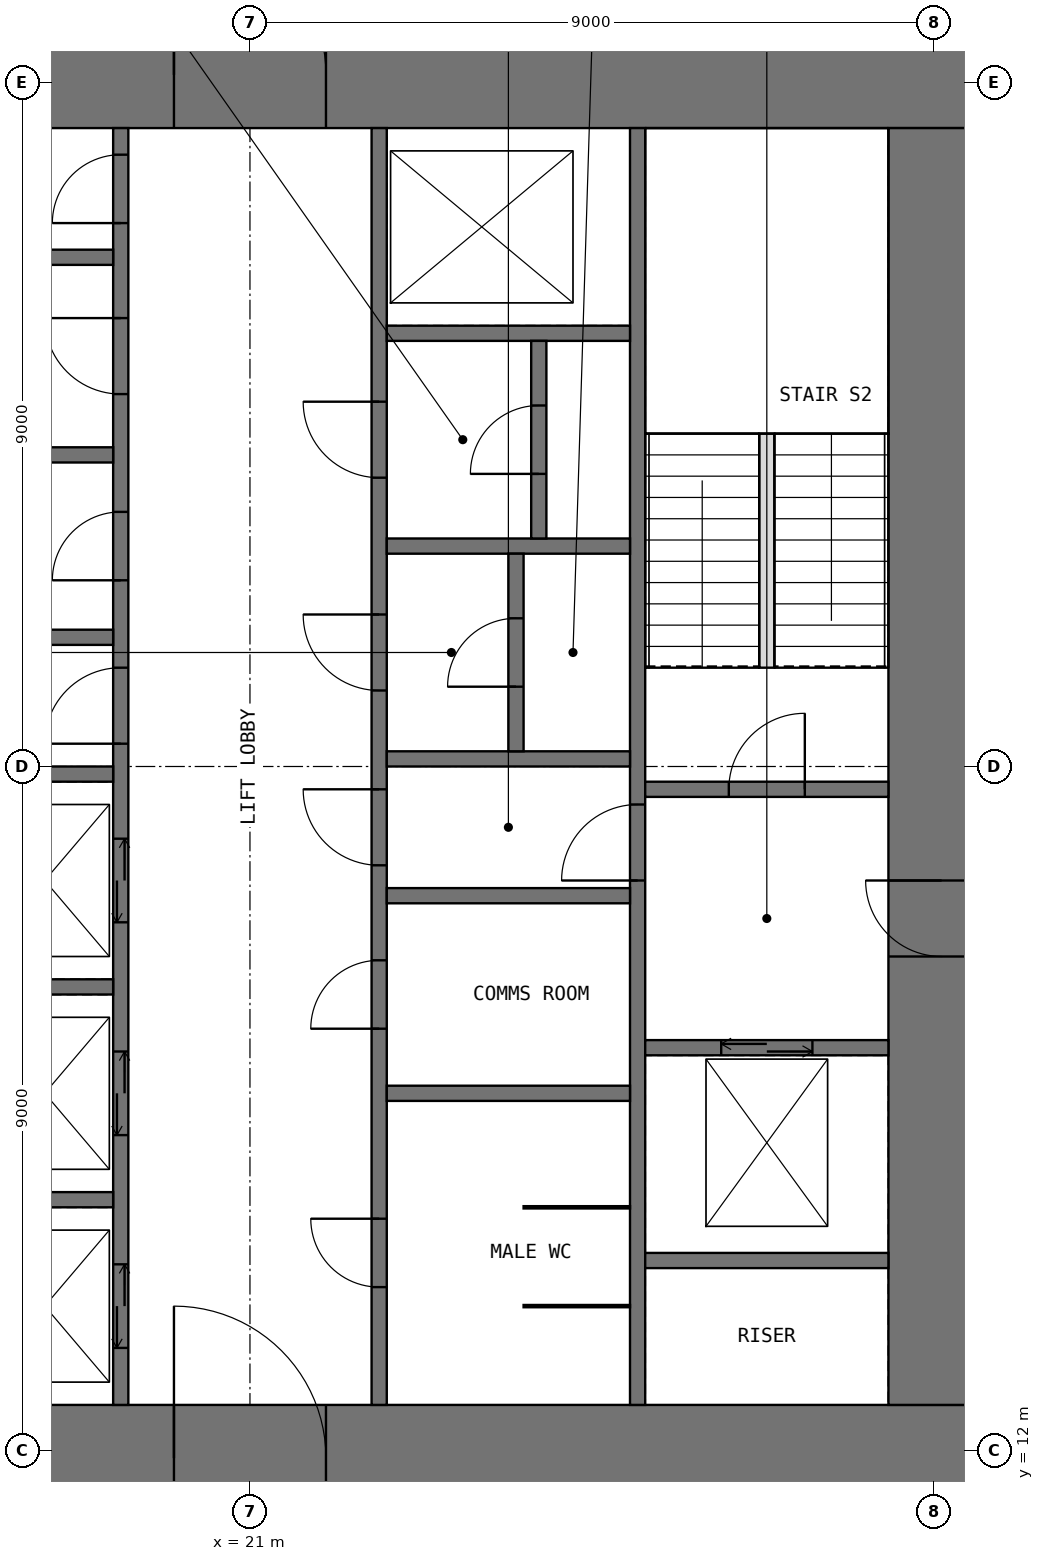
"""IFC4 building model, lengths in metres.
Left out: names, types, materials, properties, quantities, classifications, styles, units other than length and angle.
Written with IfcOpenShell. Run it as: python <this file> out.ifc"""

import sys

from ifc_helpers import new_model, si_unit, direction, frame, frame_2d, origin, place, context, subcontext, project, spatial, rectangle, extrude, element, fill, save


model = new_model("IFC4")
c1 = context("Model", 3, precision=1e-05, world=origin(), true_north=direction((0.0, 1.0)))
c2 = subcontext(c1, "Body", "Model", "MODEL_VIEW")
j1 = project(units=[si_unit("LENGTHUNIT", "METRE"), si_unit("PLANEANGLEUNIT", "RADIAN")], contexts=[c1])
p1 = place(None, origin())
s1 = spatial("IfcSite", under=j1, at=p1, CompositionType="ELEMENT")
p2 = place(p1, origin())
s2 = spatial("IfcBuilding", under=s1, at=p2, CompositionType="ELEMENT")
p3 = place(p2, frame((0.0, 0.0, 226.5)))
s3 = spatial("IfcBuildingStorey", under=s2, at=p3, CompositionType="ELEMENT", Elevation=226.5)
p4 = place(p3, frame((11.2, 11.9, -0.05), z_axis=(0.0, 0.0, 1.0), x_axis=(1.0, 0.0, 0.0)))
e1 = element("IfcWall", 1, at=p4, inside=s3, PredefinedType="SHEAR", context=c2, shape_type="SweptSolid", body=[
    extrude(rectangle(XDim=19.6, YDim=1.4, at=frame_2d((9.8, 0.0))), origin(), (0.0, 0.0, 1.0), 4.0),
])
p5 = place(p4, frame((8.8, 0.0, 0.05)))
e2 = element("IfcOpeningElement", 2, at=p5, cuts=e1, PredefinedType="OPENING", context=c2, shape_type="SweptSolid", body=[
    extrude(rectangle(XDim=2.0, YDim=2.2, at=frame_2d((1.0, 1.1))), frame((0.0, 0.71, 0.0), z_axis=(0.0, -1.0, 0.0), x_axis=(1.0, 0.0, 0.0)), (0.0, 0.0, 1.0), 1.42),
])
p6 = place(p3, frame((11.2, 30.1, -0.05), z_axis=(0.0, 0.0, 1.0), x_axis=(1.0, 0.0, 0.0)))
e3 = element("IfcWall", 3, at=p6, inside=s3, PredefinedType="SHEAR", context=c2, shape_type="SweptSolid", body=[
    extrude(rectangle(XDim=19.6, YDim=1.4, at=frame_2d((9.8, 0.0))), origin(), (0.0, 0.0, 1.0), 4.0),
])
p7 = place(p6, frame((8.8, 0.0, 0.05)))
e4 = element("IfcOpeningElement", 4, at=p7, cuts=e3, PredefinedType="OPENING", context=c2, shape_type="SweptSolid", body=[
    extrude(rectangle(XDim=2.0, YDim=2.2, at=frame_2d((1.0, 1.1))), frame((0.0, 0.71, 0.0), z_axis=(0.0, -1.0, 0.0), x_axis=(1.0, 0.0, 0.0)), (0.0, 0.0, 1.0), 1.42),
])
p8 = place(p3, frame((30.1, 12.6, -0.05), z_axis=(0.0, 0.0, 1.0), x_axis=(0.0, 1.0, 0.0)))
e5 = element("IfcWall", 5, at=p8, inside=s3, PredefinedType="SHEAR", context=c2, shape_type="SweptSolid", body=[
    extrude(rectangle(XDim=16.8, YDim=1.4, at=frame_2d((8.4, 0.0))), origin(), (0.0, 0.0, 1.0), 4.0),
])
p9 = place(p8, frame((5.9, 0.0, 0.05)))
e6 = element("IfcOpeningElement", 6, at=p9, cuts=e5, PredefinedType="OPENING", context=c2, shape_type="SweptSolid", body=[
    extrude(rectangle(XDim=1.0, YDim=2.2, at=frame_2d((0.5, 1.1))), frame((0.0, 0.71, 0.0), z_axis=(0.0, -1.0, 0.0), x_axis=(1.0, 0.0, 0.0)), (0.0, 0.0, 1.0), 1.42),
])
p10 = place(p3, frame((19.3, 12.6, -0.05), z_axis=(0.0, 0.0, 1.0), x_axis=(0.0, 1.0, 0.0)))
e7 = element("IfcWall", 7, at=p10, inside=s3, PredefinedType="SHEAR", context=c2, shape_type="SweptSolid", body=[
    extrude(rectangle(XDim=16.8, YDim=0.2, at=frame_2d((8.4, 0.0))), origin(), (0.0, 0.0, 1.0), 4.0),
])
p11 = place(p10, frame((8.7, 0.0, 0.05)))
e8 = element("IfcOpeningElement", 8, at=p11, cuts=e7, PredefinedType="OPENING", context=c2, shape_type="SweptSolid", body=[
    extrude(rectangle(XDim=1.0, YDim=2.2, at=frame_2d((0.5, 1.1))), frame((0.0, 0.11, 0.0), z_axis=(0.0, -1.0, 0.0), x_axis=(1.0, 0.0, 0.0)), (0.0, 0.0, 1.0), 0.22),
])
p12 = place(p10, frame((10.85, 0.0, 0.05)))
e9 = element("IfcOpeningElement", 9, at=p12, cuts=e7, PredefinedType="OPENING", context=c2, shape_type="SweptSolid", body=[
    extrude(rectangle(XDim=0.9, YDim=2.2, at=frame_2d((0.45, 1.1))), frame((0.0, 0.11, 0.0), z_axis=(0.0, -1.0, 0.0), x_axis=(1.0, 0.0, 0.0)), (0.0, 0.0, 1.0), 0.22),
])
p13 = place(p10, frame((13.3, 0.0, 0.05)))
e10 = element("IfcOpeningElement", 10, at=p13, cuts=e7, PredefinedType="OPENING", context=c2, shape_type="SweptSolid", body=[
    extrude(rectangle(XDim=1.0, YDim=2.2, at=frame_2d((0.5, 1.1))), frame((0.0, 0.11, 0.0), z_axis=(0.0, -1.0, 0.0), x_axis=(1.0, 0.0, 0.0)), (0.0, 0.0, 1.0), 0.22),
])
p14 = place(p10, frame((15.55, 0.0, 0.05)))
e11 = element("IfcOpeningElement", 11, at=p14, cuts=e7, PredefinedType="OPENING", context=c2, shape_type="SweptSolid", body=[
    extrude(rectangle(XDim=0.9, YDim=2.2, at=frame_2d((0.45, 1.1))), frame((0.0, 0.11, 0.0), z_axis=(0.0, -1.0, 0.0), x_axis=(1.0, 0.0, 0.0)), (0.0, 0.0, 1.0), 0.22),
])
p15 = place(p10, frame((0.75, 0.0, 0.05)))
e12 = element("IfcOpeningElement", 12, at=p15, cuts=e7, PredefinedType="OPENING", context=c2, shape_type="SweptSolid", body=[
    extrude(rectangle(XDim=1.1, YDim=2.2, at=frame_2d((0.55, 1.1))), frame((0.0, 0.11, 0.0), z_axis=(0.0, -1.0, 0.0), x_axis=(1.0, 0.0, 0.0)), (0.0, 0.0, 1.0), 0.22),
])
p16 = place(p10, frame((3.55, 0.0, 0.05)))
e13 = element("IfcOpeningElement", 13, at=p16, cuts=e7, PredefinedType="OPENING", context=c2, shape_type="SweptSolid", body=[
    extrude(rectangle(XDim=1.1, YDim=2.2, at=frame_2d((0.55, 1.1))), frame((0.0, 0.11, 0.0), z_axis=(0.0, -1.0, 0.0), x_axis=(1.0, 0.0, 0.0)), (0.0, 0.0, 1.0), 0.22),
])
p17 = place(p10, frame((6.35, 0.0, 0.05)))
e14 = element("IfcOpeningElement", 14, at=p17, cuts=e7, PredefinedType="OPENING", context=c2, shape_type="SweptSolid", body=[
    extrude(rectangle(XDim=1.1, YDim=2.2, at=frame_2d((0.55, 1.1))), frame((0.0, 0.11, 0.0), z_axis=(0.0, -1.0, 0.0), x_axis=(1.0, 0.0, 0.0)), (0.0, 0.0, 1.0), 0.22),
])
p18 = place(p3, frame((22.7, 12.6, -0.05), z_axis=(0.0, 0.0, 1.0), x_axis=(0.0, 1.0, 0.0)))
e15 = element("IfcWall", 15, at=p18, inside=s3, PredefinedType="SHEAR", context=c2, shape_type="SweptSolid", body=[
    extrude(rectangle(XDim=16.8, YDim=0.2, at=frame_2d((8.4, 0.0))), origin(), (0.0, 0.0, 1.0), 4.0),
])
p19 = place(p18, frame((7.1, 0.0, 0.05)))
e16 = element("IfcOpeningElement", 16, at=p19, cuts=e15, PredefinedType="OPENING", context=c2, shape_type="SweptSolid", body=[
    extrude(rectangle(XDim=1.0, YDim=2.2, at=frame_2d((0.5, 1.1))), frame((0.0, 0.11, 0.0), z_axis=(0.0, -1.0, 0.0), x_axis=(1.0, 0.0, 0.0)), (0.0, 0.0, 1.0), 0.22),
])
p20 = place(p18, frame((1.55, 0.0, 0.05)))
e17 = element("IfcOpeningElement", 17, at=p20, cuts=e15, PredefinedType="OPENING", context=c2, shape_type="SweptSolid", body=[
    extrude(rectangle(XDim=0.9, YDim=2.2, at=frame_2d((0.45, 1.1))), frame((0.0, 0.11, 0.0), z_axis=(0.0, -1.0, 0.0), x_axis=(1.0, 0.0, 0.0)), (0.0, 0.0, 1.0), 0.22),
])
p21 = place(p18, frame((4.95, 0.0, 0.05)))
e18 = element("IfcOpeningElement", 18, at=p21, cuts=e15, PredefinedType="OPENING", context=c2, shape_type="SweptSolid", body=[
    extrude(rectangle(XDim=0.9, YDim=2.2, at=frame_2d((0.45, 1.1))), frame((0.0, 0.11, 0.0), z_axis=(0.0, -1.0, 0.0), x_axis=(1.0, 0.0, 0.0)), (0.0, 0.0, 1.0), 0.22),
])
p22 = place(p18, frame((9.4, 0.0, 0.05)))
e19 = element("IfcOpeningElement", 19, at=p22, cuts=e15, PredefinedType="OPENING", context=c2, shape_type="SweptSolid", body=[
    extrude(rectangle(XDim=1.0, YDim=2.2, at=frame_2d((0.5, 1.1))), frame((0.0, 0.11, 0.0), z_axis=(0.0, -1.0, 0.0), x_axis=(1.0, 0.0, 0.0)), (0.0, 0.0, 1.0), 0.22),
])
p23 = place(p18, frame((12.2, 0.0, 0.05)))
e20 = element("IfcOpeningElement", 20, at=p23, cuts=e15, PredefinedType="OPENING", context=c2, shape_type="SweptSolid", body=[
    extrude(rectangle(XDim=1.0, YDim=2.2, at=frame_2d((0.5, 1.1))), frame((0.0, 0.11, 0.0), z_axis=(0.0, -1.0, 0.0), x_axis=(1.0, 0.0, 0.0)), (0.0, 0.0, 1.0), 0.22),
])
p24 = place(p3, frame((26.1, 12.6, -0.05), z_axis=(0.0, 0.0, 1.0), x_axis=(0.0, 1.0, 0.0)))
e21 = element("IfcWall", 21, at=p24, inside=s3, PredefinedType="SHEAR", context=c2, shape_type="SweptSolid", body=[
    extrude(rectangle(XDim=16.8, YDim=0.2, at=frame_2d((8.4, 0.0))), origin(), (0.0, 0.0, 1.0), 4.0),
])
p25 = place(p24, frame((6.9, 0.0, 0.05)))
e22 = element("IfcOpeningElement", 22, at=p25, cuts=e21, PredefinedType="OPENING", context=c2, shape_type="SweptSolid", body=[
    extrude(rectangle(XDim=1.0, YDim=2.2, at=frame_2d((0.5, 1.1))), frame((0.0, 0.11, 0.0), z_axis=(0.0, -1.0, 0.0), x_axis=(1.0, 0.0, 0.0)), (0.0, 0.0, 1.0), 0.22),
])
for number, where, z_axis, x_axis in (
    (23, (16.0, 15.3, -0.05), (0.0, 0.0, 1.0), (1.0, 0.0, 0.0)),
    (24, (16.0, 18.1, -0.05), (0.0, 0.0, 1.0), (1.0, 0.0, 0.0)),
    (25, (16.0, 20.9, -0.05), (0.0, 0.0, 1.0), (1.0, 0.0, 0.0)),
    (26, (16.0, 22.7, -0.05), (0.0, 0.0, 1.0), (1.0, 0.0, 0.0)),
    (27, (16.0, 25.1, -0.05), (0.0, 0.0, 1.0), (1.0, 0.0, 0.0)),
    (28, (16.0, 27.7, -0.05), (0.0, 0.0, 1.0), (1.0, 0.0, 0.0)),
    (29, (22.8, 16.7, -0.05), (0.0, 0.0, 1.0), (1.0, 0.0, 0.0)),
    (30, (22.8, 19.3, -0.05), (0.0, 0.0, 1.0), (1.0, 0.0, 0.0)),
    (31, (22.8, 21.1, -0.05), (0.0, 0.0, 1.0), (1.0, 0.0, 0.0)),
    (32, (22.8, 23.9, -0.05), (0.0, 0.0, 1.0), (1.0, 0.0, 0.0)),
    (33, (22.8, 26.7, -0.05), (0.0, 0.0, 1.0), (1.0, 0.0, 0.0)),
    (34, (26.2, 14.5, -0.05), (0.0, 0.0, 1.0), (1.0, 0.0, 0.0)),
):
    element("IfcWall", number, at=place(p3, frame(where, z_axis=z_axis, x_axis=x_axis)), inside=s3, PredefinedType="SHEAR", context=c2, shape_type="SweptSolid", body=[
        extrude(rectangle(XDim=3.2, YDim=0.2, at=frame_2d((1.6, 0.0))), origin(), (0.0, 0.0, 1.0), 4.0),
    ])
p26 = place(p3, frame((26.2, 17.3, -0.05), z_axis=(0.0, 0.0, 1.0), x_axis=(1.0, 0.0, 0.0)))
e35 = element("IfcWall", 35, at=p26, inside=s3, PredefinedType="SHEAR", context=c2, shape_type="SweptSolid", body=[
    extrude(rectangle(XDim=3.2, YDim=0.2, at=frame_2d((1.6, 0.0))), origin(), (0.0, 0.0, 1.0), 4.0),
])
p27 = place(p26, frame((1.0, 0.0, 0.05)))
e36 = element("IfcOpeningElement", 36, at=p27, cuts=e35, PredefinedType="OPENING", context=c2, shape_type="SweptSolid", body=[
    extrude(rectangle(XDim=1.2, YDim=2.2, at=frame_2d((0.6, 1.1))), frame((0.0, 0.11, 0.0), z_axis=(0.0, -1.0, 0.0), x_axis=(1.0, 0.0, 0.0)), (0.0, 0.0, 1.0), 0.22),
])
p28 = place(p3, frame((26.2, 20.7, -0.05), z_axis=(0.0, 0.0, 1.0), x_axis=(1.0, 0.0, 0.0)))
e37 = element("IfcWall", 37, at=p28, inside=s3, PredefinedType="SHEAR", context=c2, shape_type="SweptSolid", body=[
    extrude(rectangle(XDim=3.2, YDim=0.2, at=frame_2d((1.6, 0.0))), origin(), (0.0, 0.0, 1.0), 4.0),
])
p29 = place(p28, frame((1.1, 0.0, 0.05)))
e38 = element("IfcOpeningElement", 38, at=p29, cuts=e37, PredefinedType="OPENING", context=c2, shape_type="SweptSolid", body=[
    extrude(rectangle(XDim=1.0, YDim=2.2, at=frame_2d((0.5, 1.1))), frame((0.0, 0.11, 0.0), z_axis=(0.0, -1.0, 0.0), x_axis=(1.0, 0.0, 0.0)), (0.0, 0.0, 1.0), 0.22),
])
for number, where, z_axis, x_axis in (
    (39, (24.6, 13.9, 0.0), (0.0, 0.0, 1.0), (1.0, 0.0, 0.0)),
    (40, (24.6, 15.2, 0.0), (0.0, 0.0, 1.0), (1.0, 0.0, 0.0)),
):
    element("IfcWall", number, at=place(p3, frame(where, z_axis=z_axis, x_axis=x_axis)), inside=s3, PredefinedType="PARTITIONING", context=c2, shape_type="SweptSolid", body=[
        extrude(rectangle(XDim=1.4, YDim=0.03, at=frame_2d((0.7, 0.0))), origin(), (0.0, 0.0, 1.0), 3.75),
    ])
p30 = place(p3, frame((24.5, 21.2, -0.05), z_axis=(0.0, 0.0, 1.0), x_axis=(0.0, 1.0, 0.0)))
e41 = element("IfcWall", 41, at=p30, inside=s3, PredefinedType="SHEAR", context=c2, shape_type="SweptSolid", body=[
    extrude(rectangle(XDim=2.6, YDim=0.2, at=frame_2d((1.3, 0.0))), origin(), (0.0, 0.0, 1.0), 4.0),
])
p31 = place(p30, frame((0.85, 0.0, 0.05)))
e42 = element("IfcOpeningElement", 42, at=p31, cuts=e41, PredefinedType="OPENING", context=c2, shape_type="SweptSolid", body=[
    extrude(rectangle(XDim=0.9, YDim=2.2, at=frame_2d((0.45, 1.1))), frame((0.0, 0.11, 0.0), z_axis=(0.0, -1.0, 0.0), x_axis=(1.0, 0.0, 0.0)), (0.0, 0.0, 1.0), 0.22),
])
p32 = place(p3, frame((24.8, 24.0, -0.05), z_axis=(0.0, 0.0, 1.0), x_axis=(0.0, 1.0, 0.0)))
e43 = element("IfcWall", 43, at=p32, inside=s3, PredefinedType="SHEAR", context=c2, shape_type="SweptSolid", body=[
    extrude(rectangle(XDim=2.6, YDim=0.2, at=frame_2d((1.3, 0.0))), origin(), (0.0, 0.0, 1.0), 4.0),
])
p33 = place(p32, frame((0.85, 0.0, 0.05)))
e44 = element("IfcOpeningElement", 44, at=p33, cuts=e43, PredefinedType="OPENING", context=c2, shape_type="SweptSolid", body=[
    extrude(rectangle(XDim=0.9, YDim=2.2, at=frame_2d((0.45, 1.1))), frame((0.0, 0.11, 0.0), z_axis=(0.0, -1.0, 0.0), x_axis=(1.0, 0.0, 0.0)), (0.0, 0.0, 1.0), 0.22),
])
p34 = place(p3, frame((27.8, 22.3, 0.0), z_axis=(0.0, 0.0, 1.0), x_axis=(0.0, 1.0, 0.0)))
e45 = element("IfcWall", 45, at=p34, inside=s3, PredefinedType="PARTITIONING", context=c2, shape_type="SweptSolid", body=[
    extrude(rectangle(XDim=3.08, YDim=0.2, at=frame_2d((1.54, 0.0))), origin(), (0.0, 0.0, 1.0), 4.0),
])
p35 = place(p5, origin())
e46 = element("IfcDoor", 46, at=p35, inside=s3, OperationType="DOUBLE_DOOR_SINGLE_SWING", PredefinedType="DOOR", context=c2, shape_type="SweptSolid", body=[
    extrude(rectangle(XDim=2.0, YDim=2.2, at=frame_2d((1.0, 1.1))), frame((0.0, 0.025, 0.0), z_axis=(0.0, -1.0, 0.0), x_axis=(1.0, 0.0, 0.0)), (0.0, 0.0, 1.0), 0.05),
])
fill(e2, e46)
p36 = place(p7, origin())
e47 = element("IfcDoor", 47, at=p36, inside=s3, OperationType="DOUBLE_DOOR_SINGLE_SWING", PredefinedType="DOOR", context=c2, shape_type="SweptSolid", body=[
    extrude(rectangle(XDim=2.0, YDim=2.2, at=frame_2d((1.0, 1.1))), frame((0.0, 0.025, 0.0), z_axis=(0.0, -1.0, 0.0), x_axis=(1.0, 0.0, 0.0)), (0.0, 0.0, 1.0), 0.05),
])
fill(e4, e47)
p37 = place(p9, origin())
e48 = element("IfcDoor", 48, at=p37, inside=s3, OperationType="SINGLE_SWING_RIGHT", PredefinedType="DOOR", context=c2, shape_type="SweptSolid", body=[
    extrude(rectangle(XDim=1.0, YDim=2.2, at=frame_2d((0.5, 1.1))), frame((0.0, 0.025, 0.0), z_axis=(0.0, -1.0, 0.0), x_axis=(1.0, 0.0, 0.0)), (0.0, 0.0, 1.0), 0.05),
])
fill(e6, e48)
p38 = place(p29, origin())
e49 = element("IfcDoor", 49, at=p38, inside=s3, OperationType="SINGLE_SWING_RIGHT", PredefinedType="DOOR", context=c2, shape_type="SweptSolid", body=[
    extrude(rectangle(XDim=1.0, YDim=2.2, at=frame_2d((0.5, 1.1))), frame((0.0, 0.025, 0.0), z_axis=(0.0, -1.0, 0.0), x_axis=(1.0, 0.0, 0.0)), (0.0, 0.0, 1.0), 0.05),
])
fill(e38, e49)
p39 = place(p25, origin())
e50 = element("IfcDoor", 50, at=p39, inside=s3, OperationType="SINGLE_SWING_LEFT", PredefinedType="DOOR", context=c2, shape_type="SweptSolid", body=[
    extrude(rectangle(XDim=1.0, YDim=2.2, at=frame_2d((0.5, 1.1))), frame((0.0, 0.025, 0.0), z_axis=(0.0, -1.0, 0.0), x_axis=(1.0, 0.0, 0.0)), (0.0, 0.0, 1.0), 0.05),
])
fill(e22, e50)
p40 = place(p11, origin())
e51 = element("IfcDoor", 51, at=p40, inside=s3, OperationType="SINGLE_SWING_LEFT", PredefinedType="DOOR", context=c2, shape_type="SweptSolid", body=[
    extrude(rectangle(XDim=1.0, YDim=2.2, at=frame_2d((0.5, 1.1))), frame((0.0, 0.025, 0.0), z_axis=(0.0, -1.0, 0.0), x_axis=(1.0, 0.0, 0.0)), (0.0, 0.0, 1.0), 0.05),
])
fill(e8, e51)
p41 = place(p19, origin())
e52 = element("IfcDoor", 52, at=p41, inside=s3, OperationType="SINGLE_SWING_RIGHT", PredefinedType="DOOR", context=c2, shape_type="SweptSolid", body=[
    extrude(rectangle(XDim=1.0, YDim=2.2, at=frame_2d((0.5, 1.1))), frame((0.0, 0.025, 0.0), z_axis=(0.0, -1.0, 0.0), x_axis=(1.0, 0.0, 0.0)), (0.0, 0.0, 1.0), 0.05),
])
fill(e16, e52)
p42 = place(p12, origin())
e53 = element("IfcDoor", 53, at=p42, inside=s3, OperationType="SINGLE_SWING_LEFT", PredefinedType="DOOR", context=c2, shape_type="SweptSolid", body=[
    extrude(rectangle(XDim=0.9, YDim=2.2, at=frame_2d((0.45, 1.1))), frame((0.0, 0.025, 0.0), z_axis=(0.0, -1.0, 0.0), x_axis=(1.0, 0.0, 0.0)), (0.0, 0.0, 1.0), 0.05),
])
fill(e9, e53)
p43 = place(p13, origin())
e54 = element("IfcDoor", 54, at=p43, inside=s3, OperationType="SINGLE_SWING_RIGHT", PredefinedType="DOOR", context=c2, shape_type="SweptSolid", body=[
    extrude(rectangle(XDim=1.0, YDim=2.2, at=frame_2d((0.5, 1.1))), frame((0.0, 0.025, 0.0), z_axis=(0.0, -1.0, 0.0), x_axis=(1.0, 0.0, 0.0)), (0.0, 0.0, 1.0), 0.05),
])
fill(e10, e54)
p44 = place(p14, origin())
e55 = element("IfcDoor", 55, at=p44, inside=s3, OperationType="SINGLE_SWING_LEFT", PredefinedType="DOOR", context=c2, shape_type="SweptSolid", body=[
    extrude(rectangle(XDim=0.9, YDim=2.2, at=frame_2d((0.45, 1.1))), frame((0.0, 0.025, 0.0), z_axis=(0.0, -1.0, 0.0), x_axis=(1.0, 0.0, 0.0)), (0.0, 0.0, 1.0), 0.05),
])
fill(e11, e55)
p45 = place(p20, origin())
e56 = element("IfcDoor", 56, at=p45, inside=s3, OperationType="SINGLE_SWING_RIGHT", PredefinedType="DOOR", context=c2, shape_type="SweptSolid", body=[
    extrude(rectangle(XDim=0.9, YDim=2.2, at=frame_2d((0.45, 1.1))), frame((0.0, 0.025, 0.0), z_axis=(0.0, -1.0, 0.0), x_axis=(1.0, 0.0, 0.0)), (0.0, 0.0, 1.0), 0.05),
])
fill(e17, e56)
p46 = place(p21, origin())
e57 = element("IfcDoor", 57, at=p46, inside=s3, OperationType="SINGLE_SWING_LEFT", PredefinedType="DOOR", context=c2, shape_type="SweptSolid", body=[
    extrude(rectangle(XDim=0.9, YDim=2.2, at=frame_2d((0.45, 1.1))), frame((0.0, 0.025, 0.0), z_axis=(0.0, -1.0, 0.0), x_axis=(1.0, 0.0, 0.0)), (0.0, 0.0, 1.0), 0.05),
])
fill(e18, e57)
p47 = place(p22, origin())
e58 = element("IfcDoor", 58, at=p47, inside=s3, OperationType="SINGLE_SWING_RIGHT", PredefinedType="DOOR", context=c2, shape_type="SweptSolid", body=[
    extrude(rectangle(XDim=1.0, YDim=2.2, at=frame_2d((0.5, 1.1))), frame((0.0, 0.025, 0.0), z_axis=(0.0, -1.0, 0.0), x_axis=(1.0, 0.0, 0.0)), (0.0, 0.0, 1.0), 0.05),
])
fill(e19, e58)
p48 = place(p31, origin())
e59 = element("IfcDoor", 59, at=p48, inside=s3, OperationType="SINGLE_SWING_LEFT", PredefinedType="DOOR", context=c2, shape_type="SweptSolid", body=[
    extrude(rectangle(XDim=0.9, YDim=2.2, at=frame_2d((0.45, 1.1))), frame((0.0, 0.025, 0.0), z_axis=(0.0, -1.0, 0.0), x_axis=(1.0, 0.0, 0.0)), (0.0, 0.0, 1.0), 0.05),
])
fill(e42, e59)
p49 = place(p23, origin())
e60 = element("IfcDoor", 60, at=p49, inside=s3, OperationType="SINGLE_SWING_RIGHT", PredefinedType="DOOR", context=c2, shape_type="SweptSolid", body=[
    extrude(rectangle(XDim=1.0, YDim=2.2, at=frame_2d((0.5, 1.1))), frame((0.0, 0.025, 0.0), z_axis=(0.0, -1.0, 0.0), x_axis=(1.0, 0.0, 0.0)), (0.0, 0.0, 1.0), 0.05),
])
fill(e20, e60)
p50 = place(p33, origin())
e61 = element("IfcDoor", 61, at=p50, inside=s3, OperationType="SINGLE_SWING_LEFT", PredefinedType="DOOR", context=c2, shape_type="SweptSolid", body=[
    extrude(rectangle(XDim=0.9, YDim=2.2, at=frame_2d((0.45, 1.1))), frame((0.0, 0.025, 0.0), z_axis=(0.0, -1.0, 0.0), x_axis=(1.0, 0.0, 0.0)), (0.0, 0.0, 1.0), 0.05),
])
fill(e44, e61)
p51 = place(p15, origin())
e62 = element("IfcDoor", 62, at=p51, inside=s3, OperationType="DOUBLE_DOOR_SLIDING", PredefinedType="DOOR", context=c2, shape_type="SweptSolid", body=[
    extrude(rectangle(XDim=1.1, YDim=2.2, at=frame_2d((0.55, 1.1))), frame((0.0, 0.025, 0.0), z_axis=(0.0, -1.0, 0.0), x_axis=(1.0, 0.0, 0.0)), (0.0, 0.0, 1.0), 0.05),
])
fill(e12, e62)
p52 = place(p16, origin())
e63 = element("IfcDoor", 63, at=p52, inside=s3, OperationType="DOUBLE_DOOR_SLIDING", PredefinedType="DOOR", context=c2, shape_type="SweptSolid", body=[
    extrude(rectangle(XDim=1.1, YDim=2.2, at=frame_2d((0.55, 1.1))), frame((0.0, 0.025, 0.0), z_axis=(0.0, -1.0, 0.0), x_axis=(1.0, 0.0, 0.0)), (0.0, 0.0, 1.0), 0.05),
])
fill(e13, e63)
p53 = place(p17, origin())
e64 = element("IfcDoor", 64, at=p53, inside=s3, OperationType="DOUBLE_DOOR_SLIDING", PredefinedType="DOOR", context=c2, shape_type="SweptSolid", body=[
    extrude(rectangle(XDim=1.1, YDim=2.2, at=frame_2d((0.55, 1.1))), frame((0.0, 0.025, 0.0), z_axis=(0.0, -1.0, 0.0), x_axis=(1.0, 0.0, 0.0)), (0.0, 0.0, 1.0), 0.05),
])
fill(e14, e64)
p54 = place(p27, origin())
e65 = element("IfcDoor", 65, at=p54, inside=s3, OperationType="DOUBLE_DOOR_SLIDING", PredefinedType="DOOR", context=c2, shape_type="SweptSolid", body=[
    extrude(rectangle(XDim=1.2, YDim=2.2, at=frame_2d((0.6, 1.1))), frame((0.0, 0.025, 0.0), z_axis=(0.0, -1.0, 0.0), x_axis=(1.0, 0.0, 0.0)), (0.0, 0.0, 1.0), 0.05),
])
fill(e36, e65)
save(model, sys.argv[1])
